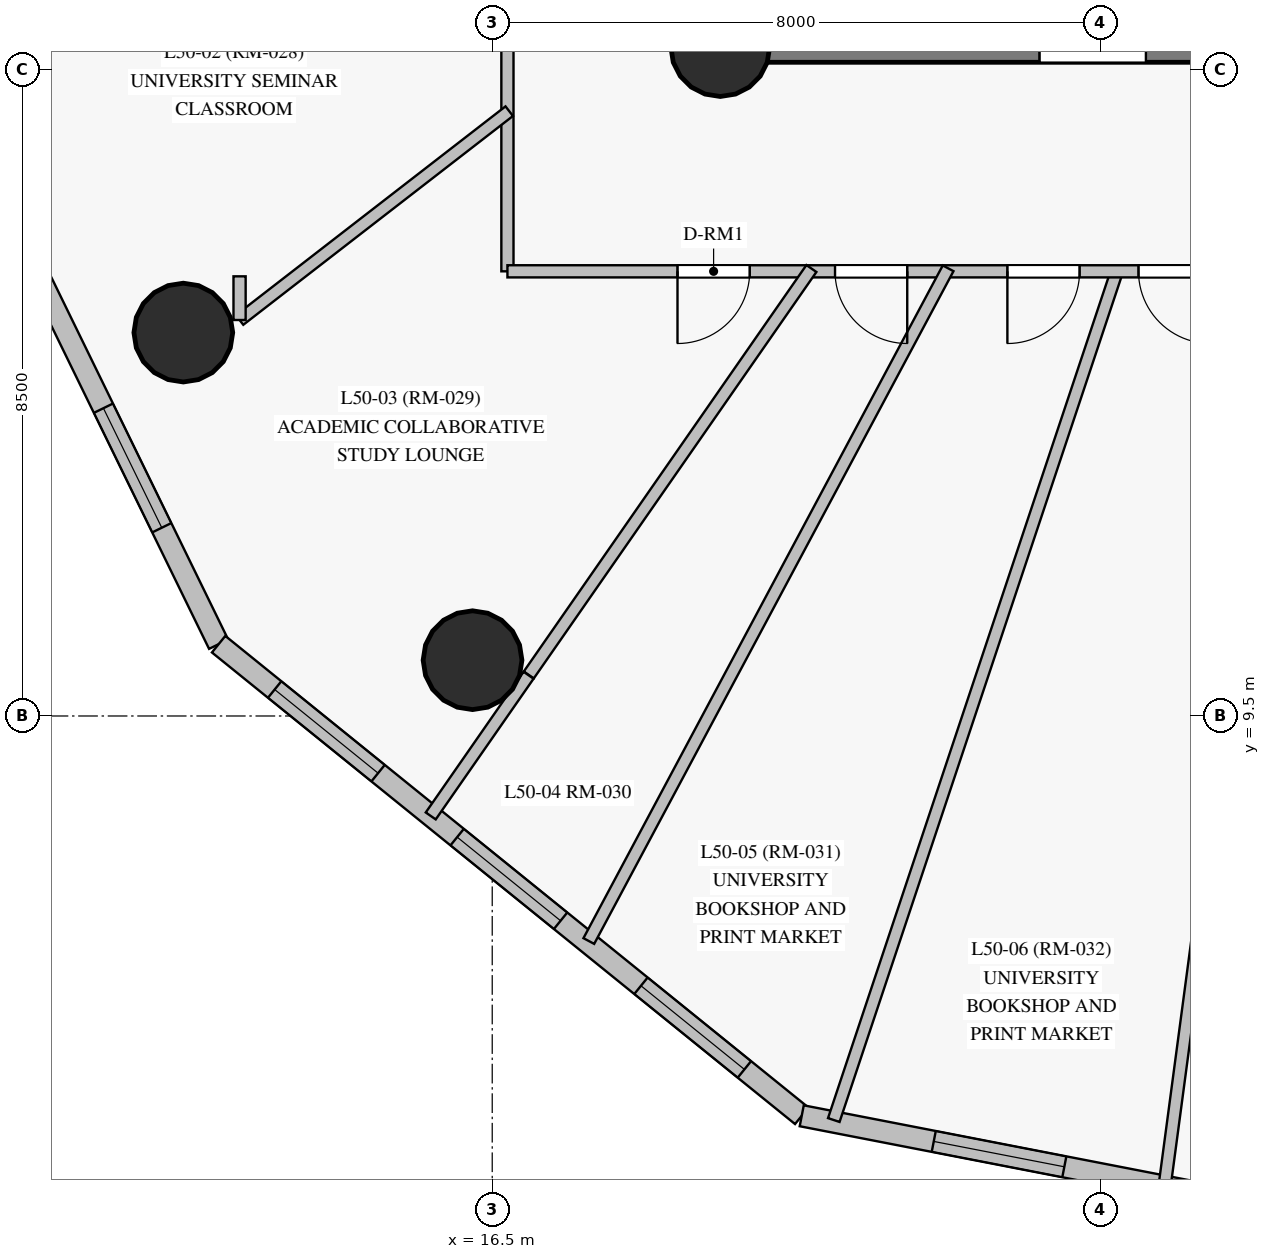
"""IFC4 building model, lengths in metres.
Left out: names, types, materials, properties, quantities, classifications, styles, units other than length and angle.
Written with IfcOpenShell. Run it as: python <this file> out.ifc"""

import sys

from ifc_helpers import new_model, si_unit, direction, frame, frame_2d, origin, origin_with_axes, origin_2d, place, context, subcontext, project, spatial, rectangle, circle, extrude, source, transform, mapped, element, fill, save


model = new_model("IFC4")
c1 = context("Model", 3, precision=1e-05, world=origin(), true_north=direction((0.0, 1.0)))
c2 = subcontext(c1, "Body", "Model", "MODEL_VIEW")
j1 = project(units=[si_unit("LENGTHUNIT", "METRE"), si_unit("PLANEANGLEUNIT", "RADIAN")], contexts=[c1])
p1 = place(None, origin())
s1 = spatial("IfcSite", under=j1, at=p1, CompositionType="ELEMENT")
p2 = place(p1, origin())
s2 = spatial("IfcBuilding", under=s1, at=p2, CompositionType="ELEMENT")
p3 = place(p2, frame((0.0, 0.0, 174.85)))
s3 = spatial("IfcBuildingStorey", under=s2, at=p3, CompositionType="ELEMENT", Elevation=174.85)
p4 = place(p3, frame((19.5, 18.3, 0.0), z_axis=(0.0, 0.0, 1.0), x_axis=(1.0, 0.0, 0.0)))
e1 = element("IfcWall", 1, at=p4, inside=s3, PredefinedType="SHEAR", context=c2, shape_type="SweptSolid", body=[
    extrude(rectangle(XDim=7.05, YDim=0.4, at=frame_2d((3.525, 0.0))), origin(), (0.0, 0.0, 1.0), 2.825),
])
p5 = place(p4, frame((4.2, 0.0, 0.0)))
e2 = element("IfcOpeningElement", 2, at=p5, cuts=e1, PredefinedType="OPENING", context=c2, shape_type="SweptSolid", body=[
    extrude(rectangle(XDim=1.4, YDim=2.2, at=frame_2d((0.7, 1.1))), frame((0.0, 0.21, 0.0), z_axis=(0.0, -1.0, 0.0), x_axis=(1.0, 0.0, 0.0)), (0.0, 0.0, 1.0), 0.42),
])
m1 = source(origin_with_axes(), c2, "Body", "SweptSolid", [
    extrude(circle(Radius=0.65, at=origin_2d()), origin(), (0.0, 0.0, 1.0), 3.05),
])
for number, where, z_axis, x_axis in (
    (3, (19.5, 18.3, 0.0), (0.0, 0.0, 1.0), (1.0, 0.0, 0.0)),
    (4, (12.436, 14.544, 0.0), (0.0, 0.0, 1.0), (1.0, 0.0, 0.0)),
    (5, (16.241, 10.234, 0.0), (0.0, 0.0, 1.0), (1.0, 0.0, 0.0)),
):
    element("IfcColumn", number, at=place(p3, frame(where, z_axis=z_axis, x_axis=x_axis)), inside=s3, PredefinedType="COLUMN", context=c2, shape_type="MappedRepresentation", body=[
        mapped(m1, transform((0.0, 0.0, 0.0), scale=1.0)),
    ])
p6 = place(p3, frame((6.8, 22.939, 0.0), z_axis=(0.0, 0.0, 1.0), x_axis=(0.438723195054, -0.898622255523, 0.0)))
e6 = element("IfcWall", 6, at=p6, inside=s3, PredefinedType="SOLIDWALL", context=c2, shape_type="SweptSolid", body=[
    extrude(rectangle(XDim=13.904, YDim=0.28, at=frame_2d((6.952, 0.0))), origin(), (0.0, 0.0, 1.0), 2.825),
])
p7 = place(p6, frame((1.357, 0.0, 0.85)))
e7 = element("IfcOpeningElement", 7, at=p7, cuts=e6, PredefinedType="OPENING", context=c2, shape_type="SweptSolid", body=[
    extrude(rectangle(XDim=1.75, YDim=1.65, at=frame_2d((0.875, 0.825))), frame((0.0, 0.15, 0.0), z_axis=(0.0, -1.0, 0.0), x_axis=(1.0, 0.0, 0.0)), (0.0, 0.0, 1.0), 0.3),
])
p8 = place(p6, frame((6.05, 0.0, 0.85)))
e8 = element("IfcOpeningElement", 8, at=p8, cuts=e6, PredefinedType="OPENING", context=c2, shape_type="SweptSolid", body=[
    extrude(rectangle(XDim=1.75, YDim=1.65, at=frame_2d((0.875, 0.825))), frame((0.0, 0.15, 0.0), z_axis=(0.0, -1.0, 0.0), x_axis=(1.0, 0.0, 0.0)), (0.0, 0.0, 1.0), 0.3),
])
p9 = place(p6, frame((10.449, 0.0, 0.85)))
e9 = element("IfcOpeningElement", 9, at=p9, cuts=e6, PredefinedType="OPENING", context=c2, shape_type="SweptSolid", body=[
    extrude(rectangle(XDim=1.75, YDim=1.65, at=frame_2d((0.875, 0.825))), frame((0.0, 0.15, 0.0), z_axis=(0.0, -1.0, 0.0), x_axis=(1.0, 0.0, 0.0)), (0.0, 0.0, 1.0), 0.3),
])
p10 = place(p3, frame((12.9, 10.445, 0.0), z_axis=(0.0, 0.0, 1.0), x_axis=(0.77754327528, -0.628829432412, 0.0)))
e10 = element("IfcWall", 10, at=p10, inside=s3, PredefinedType="SOLIDWALL", context=c2, shape_type="SweptSolid", body=[
    extrude(rectangle(XDim=9.866, YDim=0.28, at=frame_2d((4.933, 0.0))), origin(), (0.0, 0.0, 1.0), 2.825),
])
p11 = place(p10, frame((0.948, 0.0, 0.85)))
e11 = element("IfcOpeningElement", 11, at=p11, cuts=e10, PredefinedType="OPENING", context=c2, shape_type="SweptSolid", body=[
    extrude(rectangle(XDim=1.75, YDim=1.65, at=frame_2d((0.875, 0.825))), frame((0.0, 0.15, 0.0), z_axis=(0.0, -1.0, 0.0), x_axis=(1.0, 0.0, 0.0)), (0.0, 0.0, 1.0), 0.3),
])
p12 = place(p10, frame((4.036, 0.0, 0.85)))
e12 = element("IfcOpeningElement", 12, at=p12, cuts=e10, PredefinedType="OPENING", context=c2, shape_type="SweptSolid", body=[
    extrude(rectangle(XDim=1.75, YDim=1.65, at=frame_2d((0.875, 0.825))), frame((0.0, 0.15, 0.0), z_axis=(0.0, -1.0, 0.0), x_axis=(1.0, 0.0, 0.0)), (0.0, 0.0, 1.0), 0.3),
])
p13 = place(p10, frame((7.146, 0.0, 0.85)))
e13 = element("IfcOpeningElement", 13, at=p13, cuts=e10, PredefinedType="OPENING", context=c2, shape_type="SweptSolid", body=[
    extrude(rectangle(XDim=1.75, YDim=1.65, at=frame_2d((0.875, 0.825))), frame((0.0, 0.15, 0.0), z_axis=(0.0, -1.0, 0.0), x_axis=(1.0, 0.0, 0.0)), (0.0, 0.0, 1.0), 0.3),
])
p14 = place(p3, frame((20.572, 4.24, 0.0), z_axis=(0.0, 0.0, 1.0), x_axis=(0.981648925616, -0.190697107574, 0.0)))
e14 = element("IfcWall", 14, at=p14, inside=s3, PredefinedType="SOLIDWALL", context=c2, shape_type="SweptSolid", body=[
    extrude(rectangle(XDim=6.779, YDim=0.28, at=frame_2d((3.39, 0.0))), origin(), (0.0, 0.0, 1.0), 2.825),
])
p15 = place(p14, frame((1.769, 0.0, 0.85)))
e15 = element("IfcOpeningElement", 15, at=p15, cuts=e14, PredefinedType="OPENING", context=c2, shape_type="SweptSolid", body=[
    extrude(rectangle(XDim=1.75, YDim=1.65, at=frame_2d((0.875, 0.825))), frame((0.0, 0.15, 0.0), z_axis=(0.0, -1.0, 0.0), x_axis=(1.0, 0.0, 0.0)), (0.0, 0.0, 1.0), 0.3),
])
p16 = place(p14, frame((5.314, 0.0, 0.85)))
e16 = element("IfcOpeningElement", 16, at=p16, cuts=e14, PredefinedType="OPENING", context=c2, shape_type="SweptSolid", body=[
    extrude(rectangle(XDim=0.95, YDim=1.5, at=frame_2d((0.475, 0.75))), frame((0.0, 0.15, 0.0), z_axis=(0.0, -1.0, 0.0), x_axis=(1.0, 0.0, 0.0)), (0.0, 0.0, 1.0), 0.3),
])
p17 = place(p3, frame((16.7, 15.35, 0.0), z_axis=(0.0, 0.0, 1.0), x_axis=(0.0, 1.0, 0.0)))
e17 = element("IfcWall", 17, at=p17, inside=s3, PredefinedType="PARTITIONING", context=c2, shape_type="SweptSolid", body=[
    extrude(rectangle(XDim=22.3, YDim=0.16, at=frame_2d((11.15, 0.0))), origin(), (0.0, 0.0, 1.0), 2.275),
])
p18 = place(p17, frame((7.33, 0.0, 0.0)))
e18 = element("IfcOpeningElement", 18, at=p18, cuts=e17, PredefinedType="OPENING", context=c2, shape_type="SweptSolid", body=[
    extrude(rectangle(XDim=0.95, YDim=2.15, at=frame_2d((0.475, 1.075))), frame((0.0, 0.09, 0.0), z_axis=(0.0, -1.0, 0.0), x_axis=(1.0, 0.0, 0.0)), (0.0, 0.0, 1.0), 0.18),
])
p19 = place(p17, frame((5.1, 0.0, 0.0)))
e19 = element("IfcOpeningElement", 19, at=p19, cuts=e17, PredefinedType="OPENING", context=c2, shape_type="SweptSolid", body=[
    extrude(rectangle(XDim=0.96, YDim=2.15, at=frame_2d((0.48, 1.075))), frame((0.0, 0.09, 0.0), z_axis=(0.0, -1.0, 0.0), x_axis=(1.0, 0.0, 0.0)), (0.0, 0.0, 1.0), 0.18),
])
p20 = place(p17, frame((16.64, 0.0, 0.0)))
e20 = element("IfcOpeningElement", 20, at=p20, cuts=e17, PredefinedType="OPENING", context=c2, shape_type="SweptSolid", body=[
    extrude(rectangle(XDim=0.95, YDim=2.15, at=frame_2d((0.475, 1.075))), frame((0.0, 0.09, 0.0), z_axis=(0.0, -1.0, 0.0), x_axis=(1.0, 0.0, 0.0)), (0.0, 0.0, 1.0), 0.18),
])
p21 = place(p17, frame((11.315, 0.0, 0.0)))
e21 = element("IfcOpeningElement", 21, at=p21, cuts=e17, PredefinedType="OPENING", context=c2, shape_type="SweptSolid", body=[
    extrude(rectangle(XDim=0.95, YDim=2.15, at=frame_2d((0.475, 1.075))), frame((0.0, 0.09, 0.0), z_axis=(0.0, -1.0, 0.0), x_axis=(1.0, 0.0, 0.0)), (0.0, 0.0, 1.0), 0.18),
])
p22 = place(p3, frame((26.956, 15.38, 0.0), z_axis=(0.0, 0.0, 1.0), x_axis=(-0.13225454834, -0.991215786014, 0.0)))
e22 = element("IfcWall", 22, at=p22, inside=s3, PredefinedType="PARTITIONING", context=c2, shape_type="SweptSolid", body=[
    extrude(rectangle(XDim=12.148, YDim=0.16, at=frame_2d((6.074, 0.0))), origin(), (0.0, 0.0, 1.0), 2.275),
])
p23 = place(p3, frame((24.727, 15.378, 0.0), z_axis=(0.0, 0.0, 1.0), x_axis=(-0.316382932595, -0.948631561758, 0.0)))
e23 = element("IfcWall", 23, at=p23, inside=s3, PredefinedType="PARTITIONING", context=c2, shape_type="SweptSolid", body=[
    extrude(rectangle(XDim=11.8, YDim=0.16, at=frame_2d((5.9, 0.0))), origin(), (0.0, 0.0, 1.0), 2.825),
])
p24 = place(p3, frame((27.55, 15.35, 0.0), z_axis=(0.0, 0.0, 1.0), x_axis=(-1.0, 0.0, 0.0)))
e24 = element("IfcWall", 24, at=p24, inside=s3, PredefinedType="PARTITIONING", context=c2, shape_type="SweptSolid", body=[
    extrude(rectangle(XDim=10.85, YDim=0.16, at=frame_2d((5.425, 0.0))), origin(), (0.0, 0.0, 1.0), 2.375),
])
p25 = place(p24, frame((7.663, 0.0, 0.0)))
e25 = element("IfcOpeningElement", 25, at=p25, cuts=e24, PredefinedType="OPENING", context=c2, shape_type="SweptSolid", body=[
    extrude(rectangle(XDim=0.95, YDim=2.15, at=frame_2d((0.475, 1.075))), frame((0.0, 0.09, 0.0), z_axis=(0.0, -1.0, 0.0), x_axis=(1.0, 0.0, 0.0)), (0.0, 0.0, 1.0), 0.18),
])
p26 = place(p24, frame((5.59, 0.0, 0.0)))
e26 = element("IfcOpeningElement", 26, at=p26, cuts=e24, PredefinedType="OPENING", context=c2, shape_type="SweptSolid", body=[
    extrude(rectangle(XDim=0.95, YDim=2.15, at=frame_2d((0.475, 1.075))), frame((0.0, 0.09, 0.0), z_axis=(0.0, -1.0, 0.0), x_axis=(1.0, 0.0, 0.0)), (0.0, 0.0, 1.0), 0.18),
])
p27 = place(p24, frame((3.323, 0.0, 0.0)))
e27 = element("IfcOpeningElement", 27, at=p27, cuts=e24, PredefinedType="OPENING", context=c2, shape_type="SweptSolid", body=[
    extrude(rectangle(XDim=0.95, YDim=2.15, at=frame_2d((0.475, 1.075))), frame((0.0, 0.09, 0.0), z_axis=(0.0, -1.0, 0.0), x_axis=(1.0, 0.0, 0.0)), (0.0, 0.0, 1.0), 0.18),
])
p28 = place(p24, frame((1.597, 0.0, 0.0)))
e28 = element("IfcOpeningElement", 28, at=p28, cuts=e24, PredefinedType="OPENING", context=c2, shape_type="SweptSolid", body=[
    extrude(rectangle(XDim=0.95, YDim=2.15, at=frame_2d((0.475, 1.075))), frame((0.0, 0.09, 0.0), z_axis=(0.0, -1.0, 0.0), x_axis=(1.0, 0.0, 0.0)), (0.0, 0.0, 1.0), 0.18),
])
p29 = place(p3, frame((22.498, 15.39, 0.0), z_axis=(0.0, 0.0, 1.0), x_axis=(-0.471121101589, -0.882068539082, 0.0)))
e29 = element("IfcWall", 29, at=p29, inside=s3, PredefinedType="PARTITIONING", context=c2, shape_type="SweptSolid", body=[
    extrude(rectangle(XDim=10.034, YDim=0.16, at=frame_2d((5.017, 0.0))), origin(), (0.0, 0.0, 1.0), 2.825),
])
p30 = place(p3, frame((20.699, 15.387, 0.0), z_axis=(0.0, 0.0, 1.0), x_axis=(-0.570926088809, -0.821001462311, 0.0)))
e30 = element("IfcWall", 30, at=p30, inside=s3, PredefinedType="PARTITIONING", context=c2, shape_type="SweptSolid", body=[
    extrude(rectangle(XDim=6.513, YDim=0.16, at=frame_2d((3.256, 0.0))), origin(), (0.0, 0.0, 1.0), 2.825),
])
p31 = place(p3, frame((16.724, 17.457, 0.0), z_axis=(0.0, 0.0, 1.0), x_axis=(-0.79066592858, -0.612247816969, 0.0)))
e31 = element("IfcWall", 31, at=p31, inside=s3, PredefinedType="PARTITIONING", context=c2, shape_type="SweptSolid", body=[
    extrude(rectangle(XDim=4.487, YDim=0.16, at=frame_2d((2.243, 0.0))), origin(), (0.0, 0.0, 1.0), 2.275),
])
p32 = place(p3, frame((16.978, 10.036, 0.0), z_axis=(0.0, 0.0, 1.0), x_axis=(-0.570864559297, -0.821044246639, 0.0)))
e32 = element("IfcWall", 32, at=p32, inside=s3, PredefinedType="PARTITIONING", context=c2, shape_type="SweptSolid", body=[
    extrude(rectangle(XDim=2.254, YDim=0.16, at=frame_2d((1.127, 0.0))), origin(), (0.0, 0.0, 1.0), 2.825),
])
p33 = place(p3, frame((13.176, 14.71, 0.0), z_axis=(0.0, 0.0, 1.0), x_axis=(0.0, 1.0, 0.0)))
e33 = element("IfcWall", 33, at=p33, inside=s3, PredefinedType="PARTITIONING", context=c2, shape_type="SweptSolid", body=[
    extrude(rectangle(XDim=0.574, YDim=0.16, at=frame_2d((0.287, 0.0))), origin(), (0.0, 0.0, 1.0), 2.275),
])
m2 = source(origin_with_axes(), c2, "Body", "SweptSolid", [
    extrude(rectangle(XDim=1.75, YDim=1.65, at=frame_2d((0.875, 0.825))), frame((0.0, 0.03, 0.0), z_axis=(0.0, -1.0, 0.0), x_axis=(1.0, 0.0, 0.0)), (0.0, 0.0, 1.0), 0.06),
])
p34 = place(p9, origin())
e34 = element("IfcWindow", 34, at=p34, inside=s3, PartitioningType="SINGLE_PANEL", PredefinedType="WINDOW", context=c2, shape_type="MappedRepresentation", body=[
    mapped(m2, transform((0.0, 0.0, 0.0), scale=1.0)),
])
fill(e9, e34)
p35 = place(p11, origin())
e35 = element("IfcWindow", 35, at=p35, inside=s3, PartitioningType="SINGLE_PANEL", PredefinedType="WINDOW", context=c2, shape_type="MappedRepresentation", body=[
    mapped(m2, transform((0.0, 0.0, 0.0), scale=1.0)),
])
fill(e11, e35)
p36 = place(p12, origin())
e36 = element("IfcWindow", 36, at=p36, inside=s3, PartitioningType="SINGLE_PANEL", PredefinedType="WINDOW", context=c2, shape_type="MappedRepresentation", body=[
    mapped(m2, transform((0.0, 0.0, 0.0), scale=1.0)),
])
fill(e12, e36)
p37 = place(p13, origin())
e37 = element("IfcWindow", 37, at=p37, inside=s3, PartitioningType="SINGLE_PANEL", PredefinedType="WINDOW", context=c2, shape_type="MappedRepresentation", body=[
    mapped(m2, transform((0.0, 0.0, 0.0), scale=1.0)),
])
fill(e13, e37)
p38 = place(p15, origin())
e38 = element("IfcWindow", 38, at=p38, inside=s3, PartitioningType="SINGLE_PANEL", PredefinedType="WINDOW", context=c2, shape_type="MappedRepresentation", body=[
    mapped(m2, transform((0.0, 0.0, 0.0), scale=1.0)),
])
fill(e15, e38)
m3 = source(origin_with_axes(), c2, "Body", "SweptSolid", [
    extrude(rectangle(XDim=0.95, YDim=2.15, at=frame_2d((0.475, 1.075))), frame((0.0, 0.025, 0.0), z_axis=(0.0, -1.0, 0.0), x_axis=(1.0, 0.0, 0.0)), (0.0, 0.0, 1.0), 0.05),
])
p39 = place(p25, origin())
e39 = element("IfcDoor", 39, at=p39, inside=s3, OperationType="SINGLE_SWING_RIGHT", PredefinedType="DOOR", context=c2, shape_type="MappedRepresentation", body=[
    mapped(m3, transform((0.0, 0.0, 0.0), scale=1.0)),
])
fill(e25, e39)
p40 = place(p26, origin())
e40 = element("IfcDoor", 40, at=p40, inside=s3, OperationType="SINGLE_SWING_LEFT", PredefinedType="DOOR", context=c2, shape_type="MappedRepresentation", body=[
    mapped(m3, transform((0.0, 0.0, 0.0), scale=1.0)),
])
fill(e26, e40)
p41 = place(p27, origin())
e41 = element("IfcDoor", 41, at=p41, inside=s3, OperationType="SINGLE_SWING_RIGHT", PredefinedType="DOOR", context=c2, shape_type="MappedRepresentation", body=[
    mapped(m3, transform((0.0, 0.0, 0.0), scale=1.0)),
])
fill(e27, e41)
p42 = place(p28, origin())
e42 = element("IfcDoor", 42, at=p42, inside=s3, OperationType="SINGLE_SWING_LEFT", PredefinedType="DOOR", context=c2, shape_type="MappedRepresentation", body=[
    mapped(m3, transform((0.0, 0.0, 0.0), scale=1.0)),
])
fill(e28, e42)
save(model, sys.argv[1])
